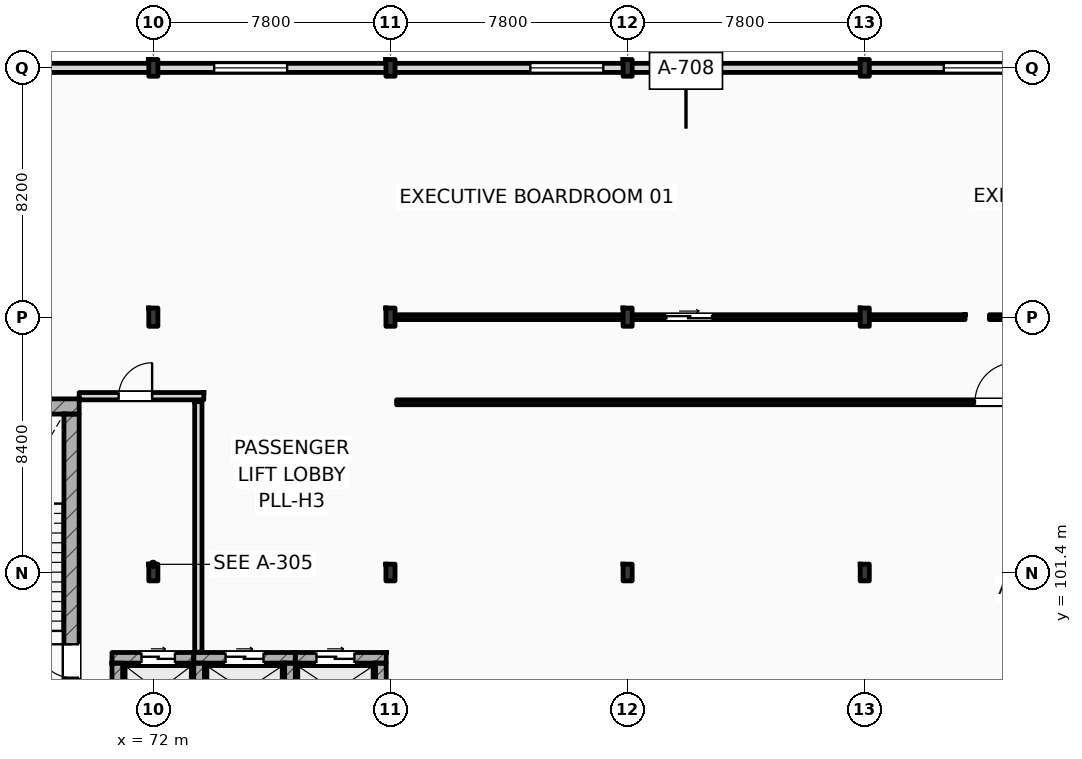
"""IFC4 building model, lengths in metres.
Left out: names, types, materials, properties, quantities, classifications, styles, units other than length and angle.
Written with IfcOpenShell. Run it as: python <this file> out.ifc"""

import sys

from ifc_helpers import new_model, si_unit, direction, frame, frame_2d, origin, origin_2d, place, context, subcontext, project, spatial, rectangle, i_section, extrude, element, fill, save


model = new_model("IFC4")
c1 = context("Model", 3, precision=1e-05, world=origin(), true_north=direction((0.0, 1.0)))
c2 = subcontext(c1, "Body", "Model", "MODEL_VIEW")
j1 = project(units=[si_unit("LENGTHUNIT", "METRE"), si_unit("PLANEANGLEUNIT", "RADIAN")], contexts=[c1])
p1 = place(None, origin())
s1 = spatial("IfcSite", under=j1, at=p1, CompositionType="ELEMENT")
p2 = place(p1, origin())
s2 = spatial("IfcBuilding", under=s1, at=p2, CompositionType="ELEMENT")
p3 = place(p2, frame((0.0, 0.0, 11.4)))
s3 = spatial("IfcBuildingStorey", under=s2, at=p3, CompositionType="ELEMENT", Elevation=11.4)
p4 = place(p3, frame((72.0, 101.4, 0.0), z_axis=(0.0, 0.0, 1.0), x_axis=(1.0, 0.0, 0.0)))
e1 = element("IfcColumn", 1, at=p4, inside=s3, PredefinedType="COLUMN", context=c2, shape_type="SweptSolid", body=[
    extrude(i_section(OverallWidth=0.3, OverallDepth=0.55, WebThickness=0.015, FlangeThickness=0.029, FilletRadius=0.027, at=origin_2d()), origin(), (0.0, 0.0, 1.0), 4.8),
])
p5 = place(p3, frame((72.0, 109.8, 0.0), z_axis=(0.0, 0.0, 1.0), x_axis=(1.0, 0.0, 0.0)))
e2 = element("IfcColumn", 2, at=p5, inside=s3, PredefinedType="COLUMN", context=c2, shape_type="SweptSolid", body=[
    extrude(i_section(OverallWidth=0.3, OverallDepth=0.6, WebThickness=0.015, FlangeThickness=0.03, FilletRadius=0.027, at=origin_2d()), origin(), (0.0, 0.0, 1.0), 4.8),
])
for number, where, z_axis, x_axis in (
    (3, (72.0, 118.0, 0.0), (0.0, 0.0, 1.0), (1.0, 0.0, 0.0)),
    (4, (79.8, 101.4, 0.0), (0.0, 0.0, 1.0), (1.0, 0.0, 0.0)),
):
    element("IfcColumn", number, at=place(p3, frame(where, z_axis=z_axis, x_axis=x_axis)), inside=s3, PredefinedType="COLUMN", context=c2, shape_type="SweptSolid", body=[
        extrude(i_section(OverallWidth=0.3, OverallDepth=0.55, WebThickness=0.015, FlangeThickness=0.029, FilletRadius=0.027, at=origin_2d()), origin(), (0.0, 0.0, 1.0), 4.8),
    ])
p6 = place(p3, frame((79.8, 109.8, 0.0), z_axis=(0.0, 0.0, 1.0), x_axis=(1.0, 0.0, 0.0)))
e5 = element("IfcColumn", 5, at=p6, inside=s3, PredefinedType="COLUMN", context=c2, shape_type="SweptSolid", body=[
    extrude(i_section(OverallWidth=0.3, OverallDepth=0.6, WebThickness=0.015, FlangeThickness=0.03, FilletRadius=0.027, at=origin_2d()), origin(), (0.0, 0.0, 1.0), 4.8),
])
for number, where, z_axis, x_axis in (
    (6, (79.8, 118.0, 0.0), (0.0, 0.0, 1.0), (1.0, 0.0, 0.0)),
    (7, (87.6, 101.4, 0.0), (0.0, 0.0, 1.0), (1.0, 0.0, 0.0)),
):
    element("IfcColumn", number, at=place(p3, frame(where, z_axis=z_axis, x_axis=x_axis)), inside=s3, PredefinedType="COLUMN", context=c2, shape_type="SweptSolid", body=[
        extrude(i_section(OverallWidth=0.3, OverallDepth=0.55, WebThickness=0.015, FlangeThickness=0.029, FilletRadius=0.027, at=origin_2d()), origin(), (0.0, 0.0, 1.0), 4.8),
    ])
p7 = place(p3, frame((87.6, 109.8, 0.0), z_axis=(0.0, 0.0, 1.0), x_axis=(1.0, 0.0, 0.0)))
e8 = element("IfcColumn", 8, at=p7, inside=s3, PredefinedType="COLUMN", context=c2, shape_type="SweptSolid", body=[
    extrude(i_section(OverallWidth=0.3, OverallDepth=0.6, WebThickness=0.015, FlangeThickness=0.03, FilletRadius=0.027, at=origin_2d()), origin(), (0.0, 0.0, 1.0), 4.8),
])
for number, where, z_axis, x_axis in (
    (9, (87.6, 118.0, 0.0), (0.0, 0.0, 1.0), (1.0, 0.0, 0.0)),
    (10, (95.4, 101.4, 0.0), (0.0, 0.0, 1.0), (1.0, 0.0, 0.0)),
):
    element("IfcColumn", number, at=place(p3, frame(where, z_axis=z_axis, x_axis=x_axis)), inside=s3, PredefinedType="COLUMN", context=c2, shape_type="SweptSolid", body=[
        extrude(i_section(OverallWidth=0.3, OverallDepth=0.55, WebThickness=0.015, FlangeThickness=0.029, FilletRadius=0.027, at=origin_2d()), origin(), (0.0, 0.0, 1.0), 4.8),
    ])
p8 = place(p3, frame((95.4, 109.8, 0.0), z_axis=(0.0, 0.0, 1.0), x_axis=(1.0, 0.0, 0.0)))
e11 = element("IfcColumn", 11, at=p8, inside=s3, PredefinedType="COLUMN", context=c2, shape_type="SweptSolid", body=[
    extrude(i_section(OverallWidth=0.3, OverallDepth=0.6, WebThickness=0.015, FlangeThickness=0.03, FilletRadius=0.027, at=origin_2d()), origin(), (0.0, 0.0, 1.0), 4.8),
])
p9 = place(p3, frame((95.4, 118.0, 0.0), z_axis=(0.0, 0.0, 1.0), x_axis=(1.0, 0.0, 0.0)))
e12 = element("IfcColumn", 12, at=p9, inside=s3, PredefinedType="COLUMN", context=c2, shape_type="SweptSolid", body=[
    extrude(i_section(OverallWidth=0.3, OverallDepth=0.55, WebThickness=0.015, FlangeThickness=0.029, FilletRadius=0.027, at=origin_2d()), origin(), (0.0, 0.0, 1.0), 4.8),
])
p10 = place(p3, frame((64.4, 106.862, 0.0), z_axis=(0.0, 0.0, 1.0), x_axis=(1.0, 0.0, 0.0)))
e13 = element("IfcWall", 13, at=p10, inside=s3, PredefinedType="SHEAR", context=c2, shape_type="SweptSolid", body=[
    extrude(rectangle(XDim=5.16, YDim=0.5, at=frame_2d((2.58, 0.0))), origin(), (0.0, 0.0, 1.0), 4.8),
])
p11 = place(p3, frame((69.31, 97.5, 0.0), z_axis=(0.0, 0.0, 1.0), x_axis=(0.0, 1.0, 0.0)))
e14 = element("IfcWall", 14, at=p11, inside=s3, PredefinedType="SHEAR", context=c2, shape_type="SweptSolid", body=[
    extrude(rectangle(XDim=9.112, YDim=0.5, at=frame_2d((4.556, 0.0))), origin(), (0.0, 0.0, 1.0), 4.8),
])
p12 = place(p11, frame((0.44, 0.0, 0.0)))
e15 = element("IfcOpeningElement", 15, at=p12, cuts=e14, PredefinedType="OPENING", context=c2, shape_type="SweptSolid", body=[
    extrude(rectangle(XDim=1.1, YDim=2.2, at=frame_2d((0.55, 1.1))), frame((0.0, 0.26, 0.0), z_axis=(0.0, -1.0, 0.0), x_axis=(1.0, 0.0, 0.0)), (0.0, 0.0, 1.0), 0.52),
])
p13 = place(p3, frame((22.5, 118.0, 0.0), z_axis=(0.0, 0.0, 1.0), x_axis=(1.0, 0.0, 0.0)))
e16 = element("IfcWall", 16, at=p13, inside=s3, PredefinedType="STANDARD", context=c2, shape_type="SweptSolid", body=[
    extrude(rectangle(XDim=97.5, YDim=0.3, at=frame_2d((48.75, 0.0))), origin(), (0.0, 0.0, 1.0), 3.96),
])
p14 = place(p13, frame((3.5, 0.0, 0.95)))
e17 = element("IfcOpeningElement", 17, at=p14, cuts=e16, PredefinedType="OPENING", context=c2, shape_type="SweptSolid", body=[
    extrude(rectangle(XDim=2.4, YDim=2.4, at=frame_2d((1.2, 1.2))), frame((0.0, 0.16, 0.0), z_axis=(0.0, -1.0, 0.0), x_axis=(1.0, 0.0, 0.0)), (0.0, 0.0, 1.0), 0.32),
])
p15 = place(p13, frame((15.1, 0.0, 0.95)))
e18 = element("IfcOpeningElement", 18, at=p15, cuts=e16, PredefinedType="OPENING", context=c2, shape_type="SweptSolid", body=[
    extrude(rectangle(XDim=2.4, YDim=2.4, at=frame_2d((1.2, 1.2))), frame((0.0, 0.16, 0.0), z_axis=(0.0, -1.0, 0.0), x_axis=(1.0, 0.0, 0.0)), (0.0, 0.0, 1.0), 0.32),
])
p16 = place(p13, frame((27.5, 0.0, 0.95)))
e19 = element("IfcOpeningElement", 19, at=p16, cuts=e16, PredefinedType="OPENING", context=c2, shape_type="SweptSolid", body=[
    extrude(rectangle(XDim=2.4, YDim=2.4, at=frame_2d((1.2, 1.2))), frame((0.0, 0.16, 0.0), z_axis=(0.0, -1.0, 0.0), x_axis=(1.0, 0.0, 0.0)), (0.0, 0.0, 1.0), 0.32),
])
p17 = place(p13, frame((38.5, 0.0, 0.95)))
e20 = element("IfcOpeningElement", 20, at=p17, cuts=e16, PredefinedType="OPENING", context=c2, shape_type="SweptSolid", body=[
    extrude(rectangle(XDim=2.4, YDim=2.4, at=frame_2d((1.2, 1.2))), frame((0.0, 0.16, 0.0), z_axis=(0.0, -1.0, 0.0), x_axis=(1.0, 0.0, 0.0)), (0.0, 0.0, 1.0), 0.32),
])
p18 = place(p13, frame((51.5, 0.0, 0.95)))
e21 = element("IfcOpeningElement", 21, at=p18, cuts=e16, PredefinedType="OPENING", context=c2, shape_type="SweptSolid", body=[
    extrude(rectangle(XDim=2.4, YDim=2.4, at=frame_2d((1.2, 1.2))), frame((0.0, 0.16, 0.0), z_axis=(0.0, -1.0, 0.0), x_axis=(1.0, 0.0, 0.0)), (0.0, 0.0, 1.0), 0.32),
])
p19 = place(p13, frame((61.9, 0.0, 0.95)))
e22 = element("IfcOpeningElement", 22, at=p19, cuts=e16, PredefinedType="OPENING", context=c2, shape_type="SweptSolid", body=[
    extrude(rectangle(XDim=2.4, YDim=2.4, at=frame_2d((1.2, 1.2))), frame((0.0, 0.16, 0.0), z_axis=(0.0, -1.0, 0.0), x_axis=(1.0, 0.0, 0.0)), (0.0, 0.0, 1.0), 0.32),
])
p20 = place(p13, frame((75.5, 0.0, 0.95)))
e23 = element("IfcOpeningElement", 23, at=p20, cuts=e16, PredefinedType="OPENING", context=c2, shape_type="SweptSolid", body=[
    extrude(rectangle(XDim=2.4, YDim=2.4, at=frame_2d((1.2, 1.2))), frame((0.0, 0.16, 0.0), z_axis=(0.0, -1.0, 0.0), x_axis=(1.0, 0.0, 0.0)), (0.0, 0.0, 1.0), 0.32),
])
p21 = place(p13, frame((85.9, 0.0, 0.95)))
e24 = element("IfcOpeningElement", 24, at=p21, cuts=e16, PredefinedType="OPENING", context=c2, shape_type="SweptSolid", body=[
    extrude(rectangle(XDim=2.4, YDim=2.4, at=frame_2d((1.2, 1.2))), frame((0.0, 0.16, 0.0), z_axis=(0.0, -1.0, 0.0), x_axis=(1.0, 0.0, 0.0)), (0.0, 0.0, 1.0), 0.32),
])
p22 = place(p3, frame((70.64, 98.595, 0.0), z_axis=(0.0, 0.0, 1.0), x_axis=(1.0, 0.0, 0.0)))
e25 = element("IfcWall", 25, at=p22, inside=s3, PredefinedType="SHEAR", context=c2, shape_type="SweptSolid", body=[
    extrude(rectangle(XDim=2.69, YDim=0.35, at=frame_2d((1.345, 0.0))), origin(), (0.0, 0.0, 1.0), 4.52),
])
p23 = place(p22, frame((0.97, 0.0, 0.0)))
e26 = element("IfcOpeningElement", 26, at=p23, cuts=e25, PredefinedType="OPENING", context=c2, shape_type="SweptSolid", body=[
    extrude(rectangle(XDim=1.1, YDim=2.2, at=frame_2d((0.55, 1.1))), frame((0.0, 0.185, 0.0), z_axis=(0.0, -1.0, 0.0), x_axis=(1.0, 0.0, 0.0)), (0.0, 0.0, 1.0), 0.37),
])
p24 = place(p3, frame((70.815, 96.58, 0.0), z_axis=(0.0, 0.0, 1.0), x_axis=(0.0, 1.0, 0.0)))
e27 = element("IfcWall", 27, at=p24, inside=s3, PredefinedType="SHEAR", context=c2, shape_type="SweptSolid", body=[
    extrude(rectangle(XDim=1.84, YDim=0.35, at=frame_2d((0.92, 0.0))), origin(), (0.0, 0.0, 1.0), 4.52),
])
p25 = place(p3, frame((73.33, 98.595, 0.0), z_axis=(0.0, 0.0, 1.0), x_axis=(1.0, 0.0, 0.0)))
e28 = element("IfcWall", 28, at=p25, inside=s3, PredefinedType="SHEAR", context=c2, shape_type="SweptSolid", body=[
    extrude(rectangle(XDim=3.34, YDim=0.35, at=frame_2d((1.67, 0.0))), origin(), (0.0, 0.0, 1.0), 4.52),
])
p26 = place(p25, frame((1.045, 0.0, 0.0)))
e29 = element("IfcOpeningElement", 29, at=p26, cuts=e28, PredefinedType="OPENING", context=c2, shape_type="SweptSolid", body=[
    extrude(rectangle(XDim=1.25, YDim=2.25, at=frame_2d((0.625, 1.125))), frame((0.0, 0.185, 0.0), z_axis=(0.0, -1.0, 0.0), x_axis=(1.0, 0.0, 0.0)), (0.0, 0.0, 1.0), 0.37),
])
for number, where, z_axis, x_axis in (
    (30, (73.505, 96.58, 0.0), (0.0, 0.0, 1.0), (0.0, 1.0, 0.0)),
    (31, (76.495, 96.58, 0.0), (0.0, 0.0, 1.0), (0.0, 1.0, 0.0)),
):
    element("IfcWall", number, at=place(p3, frame(where, z_axis=z_axis, x_axis=x_axis)), inside=s3, PredefinedType="SHEAR", context=c2, shape_type="SweptSolid", body=[
        extrude(rectangle(XDim=1.84, YDim=0.35, at=frame_2d((0.92, 0.0))), origin(), (0.0, 0.0, 1.0), 4.52),
    ])
p27 = place(p3, frame((76.67, 98.595, 0.0), z_axis=(0.0, 0.0, 1.0), x_axis=(1.0, 0.0, 0.0)))
e32 = element("IfcWall", 32, at=p27, inside=s3, PredefinedType="SHEAR", context=c2, shape_type="SweptSolid", body=[
    extrude(rectangle(XDim=2.99, YDim=0.35, at=frame_2d((1.495, 0.0))), origin(), (0.0, 0.0, 1.0), 4.52),
])
p28 = place(p27, frame((0.695, 0.0, 0.0)))
e33 = element("IfcOpeningElement", 33, at=p28, cuts=e32, PredefinedType="OPENING", context=c2, shape_type="SweptSolid", body=[
    extrude(rectangle(XDim=1.25, YDim=2.25, at=frame_2d((0.625, 1.125))), frame((0.0, 0.185, 0.0), z_axis=(0.0, -1.0, 0.0), x_axis=(1.0, 0.0, 0.0)), (0.0, 0.0, 1.0), 0.37),
])
p29 = place(p3, frame((79.485, 96.58, 0.0), z_axis=(0.0, 0.0, 1.0), x_axis=(0.0, 1.0, 0.0)))
e34 = element("IfcWall", 34, at=p29, inside=s3, PredefinedType="SHEAR", context=c2, shape_type="SweptSolid", body=[
    extrude(rectangle(XDim=1.84, YDim=0.35, at=frame_2d((0.92, 0.0))), origin(), (0.0, 0.0, 1.0), 4.11),
])
p30 = place(p3, frame((73.48, 98.78, 0.0), z_axis=(0.0, 0.0, 1.0), x_axis=(0.0, 1.0, 0.0)))
e35 = element("IfcWall", 35, at=p30, inside=s3, PredefinedType="STANDARD", context=c2, shape_type="SweptSolid", body=[
    extrude(rectangle(XDim=8.24, YDim=0.24, at=frame_2d((4.12, 0.0))), origin(), (0.0, 0.0, 1.0), 4.52),
])
p31 = place(p3, frame((69.56, 107.2, 0.0), z_axis=(0.0, 0.0, 1.0), x_axis=(1.0, 0.0, 0.0)))
e36 = element("IfcWall", 36, at=p31, inside=s3, PredefinedType="STANDARD", context=c2, shape_type="SweptSolid", body=[
    extrude(rectangle(XDim=4.1, YDim=0.24, at=frame_2d((2.05, 0.0))), origin(), (0.0, 0.0, 1.0), 4.52),
])
p32 = place(p31, frame((1.3, 0.0, 0.0)))
e37 = element("IfcOpeningElement", 37, at=p32, cuts=e36, PredefinedType="OPENING", context=c2, shape_type="SweptSolid", body=[
    extrude(rectangle(XDim=1.1, YDim=2.2, at=frame_2d((0.55, 1.1))), frame((0.0, 0.13, 0.0), z_axis=(0.0, -1.0, 0.0), x_axis=(1.0, 0.0, 0.0)), (0.0, 0.0, 1.0), 0.26),
])
p33 = place(p3, frame((80.05, 109.8, 0.0), z_axis=(0.0, 0.0, 1.0), x_axis=(1.0, 0.0, 0.0)))
e38 = element("IfcWall", 38, at=p33, inside=s3, PredefinedType="PARTITIONING", context=c2, shape_type="SweptSolid", body=[
    extrude(rectangle(XDim=18.65, YDim=0.16, at=frame_2d((9.325, 0.0))), origin(), (0.0, 0.0, 1.0), 4.06),
])
p34 = place(p33, frame((8.825, 0.0, 0.0)))
e39 = element("IfcOpeningElement", 39, at=p34, cuts=e38, PredefinedType="OPENING", context=c2, shape_type="SweptSolid", body=[
    extrude(rectangle(XDim=1.5, YDim=2.25, at=frame_2d((0.75, 1.125))), frame((0.0, 0.09, 0.0), z_axis=(0.0, -1.0, 0.0), x_axis=(1.0, 0.0, 0.0)), (0.0, 0.0, 1.0), 0.18),
])
p35 = place(p3, frame((99.5, 109.8, 0.0), z_axis=(0.0, 0.0, 1.0), x_axis=(1.0, 0.0, 0.0)))
e40 = element("IfcWall", 40, at=p35, inside=s3, PredefinedType="PARTITIONING", context=c2, shape_type="SweptSolid", body=[
    extrude(rectangle(XDim=19.8, YDim=0.16, at=frame_2d((9.9, 0.0))), origin(), (0.0, 0.0, 1.0), 3.96),
])
p36 = place(p35, frame((9.25, 0.0, 0.0)))
e41 = element("IfcOpeningElement", 41, at=p36, cuts=e40, PredefinedType="OPENING", context=c2, shape_type="SweptSolid", body=[
    extrude(rectangle(XDim=1.3, YDim=2.2, at=frame_2d((0.65, 1.1))), frame((0.0, 0.09, 0.0), z_axis=(0.0, -1.0, 0.0), x_axis=(1.0, 0.0, 0.0)), (0.0, 0.0, 1.0), 0.18),
])
p37 = place(p3, frame((80.0, 107.0, 0.0), z_axis=(0.0, 0.0, 1.0), x_axis=(1.0, 0.0, 0.0)))
e42 = element("IfcWall", 42, at=p37, inside=s3, PredefinedType="PARTITIONING", context=c2, shape_type="SweptSolid", body=[
    extrude(rectangle(XDim=39.35, YDim=0.16, at=frame_2d((19.675, 0.0))), origin(), (0.0, 0.0, 1.0), 4.52),
])
p38 = place(p37, frame((19.025, 0.0, 0.0)))
e43 = element("IfcOpeningElement", 43, at=p38, cuts=e42, PredefinedType="OPENING", context=c2, shape_type="SweptSolid", body=[
    extrude(rectangle(XDim=1.3, YDim=2.2, at=frame_2d((0.65, 1.1))), frame((0.0, 0.09, 0.0), z_axis=(0.0, -1.0, 0.0), x_axis=(1.0, 0.0, 0.0)), (0.0, 0.0, 1.0), 0.18),
])
p39 = place(p18, origin())
e44 = element("IfcWindow", 44, at=p39, inside=s3, PartitioningType="DOUBLE_PANEL_VERTICAL", PredefinedType="WINDOW", context=c2, shape_type="SweptSolid", body=[
    extrude(rectangle(XDim=2.4, YDim=2.4, at=frame_2d((1.2, 1.2))), frame((0.0, 0.03, 0.0), z_axis=(0.0, -1.0, 0.0), x_axis=(1.0, 0.0, 0.0)), (0.0, 0.0, 1.0), 0.06),
])
fill(e21, e44)
p40 = place(p19, origin())
e45 = element("IfcWindow", 45, at=p40, inside=s3, PartitioningType="DOUBLE_PANEL_VERTICAL", PredefinedType="WINDOW", context=c2, shape_type="SweptSolid", body=[
    extrude(rectangle(XDim=2.4, YDim=2.4, at=frame_2d((1.2, 1.2))), frame((0.0, 0.03, 0.0), z_axis=(0.0, -1.0, 0.0), x_axis=(1.0, 0.0, 0.0)), (0.0, 0.0, 1.0), 0.06),
])
fill(e22, e45)
p41 = place(p20, origin())
e46 = element("IfcWindow", 46, at=p41, inside=s3, PartitioningType="DOUBLE_PANEL_VERTICAL", PredefinedType="WINDOW", context=c2, shape_type="SweptSolid", body=[
    extrude(rectangle(XDim=2.4, YDim=2.4, at=frame_2d((1.2, 1.2))), frame((0.0, 0.03, 0.0), z_axis=(0.0, -1.0, 0.0), x_axis=(1.0, 0.0, 0.0)), (0.0, 0.0, 1.0), 0.06),
])
fill(e23, e46)
p42 = place(p12, origin())
e47 = element("IfcDoor", 47, at=p42, inside=s3, OperationType="SINGLE_SWING_RIGHT", PredefinedType="DOOR", context=c2, shape_type="SweptSolid", body=[
    extrude(rectangle(XDim=1.1, YDim=2.2, at=frame_2d((0.55, 1.1))), frame((0.0, 0.025, 0.0), z_axis=(0.0, -1.0, 0.0), x_axis=(1.0, 0.0, 0.0)), (0.0, 0.0, 1.0), 0.05),
])
fill(e15, e47)
p43 = place(p23, origin())
e48 = element("IfcDoor", 48, at=p43, inside=s3, OperationType="SLIDING_TO_LEFT", PredefinedType="DOOR", context=c2, shape_type="SweptSolid", body=[
    extrude(rectangle(XDim=1.1, YDim=2.2, at=frame_2d((0.55, 1.1))), frame((0.0, 0.025, 0.0), z_axis=(0.0, -1.0, 0.0), x_axis=(1.0, 0.0, 0.0)), (0.0, 0.0, 1.0), 0.05),
])
fill(e26, e48)
p44 = place(p26, origin())
e49 = element("IfcDoor", 49, at=p44, inside=s3, OperationType="SLIDING_TO_LEFT", PredefinedType="DOOR", context=c2, shape_type="SweptSolid", body=[
    extrude(rectangle(XDim=1.25, YDim=2.25, at=frame_2d((0.625, 1.125))), frame((0.0, 0.025, 0.0), z_axis=(0.0, -1.0, 0.0), x_axis=(1.0, 0.0, 0.0)), (0.0, 0.0, 1.0), 0.05),
])
fill(e29, e49)
p45 = place(p28, origin())
e50 = element("IfcDoor", 50, at=p45, inside=s3, OperationType="SLIDING_TO_LEFT", PredefinedType="DOOR", context=c2, shape_type="SweptSolid", body=[
    extrude(rectangle(XDim=1.25, YDim=2.25, at=frame_2d((0.625, 1.125))), frame((0.0, 0.025, 0.0), z_axis=(0.0, -1.0, 0.0), x_axis=(1.0, 0.0, 0.0)), (0.0, 0.0, 1.0), 0.05),
])
fill(e33, e50)
p46 = place(p32, origin())
e51 = element("IfcDoor", 51, at=p46, inside=s3, OperationType="SINGLE_SWING_RIGHT", PredefinedType="DOOR", context=c2, shape_type="SweptSolid", body=[
    extrude(rectangle(XDim=1.1, YDim=2.2, at=frame_2d((0.55, 1.1))), frame((0.0, 0.025, 0.0), z_axis=(0.0, -1.0, 0.0), x_axis=(1.0, 0.0, 0.0)), (0.0, 0.0, 1.0), 0.05),
])
fill(e37, e51)
p47 = place(p34, origin())
e52 = element("IfcDoor", 52, at=p47, inside=s3, OperationType="SLIDING_TO_RIGHT", PredefinedType="DOOR", context=c2, shape_type="SweptSolid", body=[
    extrude(rectangle(XDim=1.5, YDim=2.25, at=frame_2d((0.75, 1.125))), frame((0.0, 0.025, 0.0), z_axis=(0.0, -1.0, 0.0), x_axis=(1.0, 0.0, 0.0)), (0.0, 0.0, 1.0), 0.05),
])
fill(e39, e52)
p48 = place(p38, origin())
e53 = element("IfcDoor", 53, at=p48, inside=s3, OperationType="SINGLE_SWING_RIGHT", PredefinedType="DOOR", context=c2, shape_type="SweptSolid", body=[
    extrude(rectangle(XDim=1.3, YDim=2.2, at=frame_2d((0.65, 1.1))), frame((0.0, 0.025, 0.0), z_axis=(0.0, -1.0, 0.0), x_axis=(1.0, 0.0, 0.0)), (0.0, 0.0, 1.0), 0.05),
])
fill(e43, e53)
save(model, sys.argv[1])
